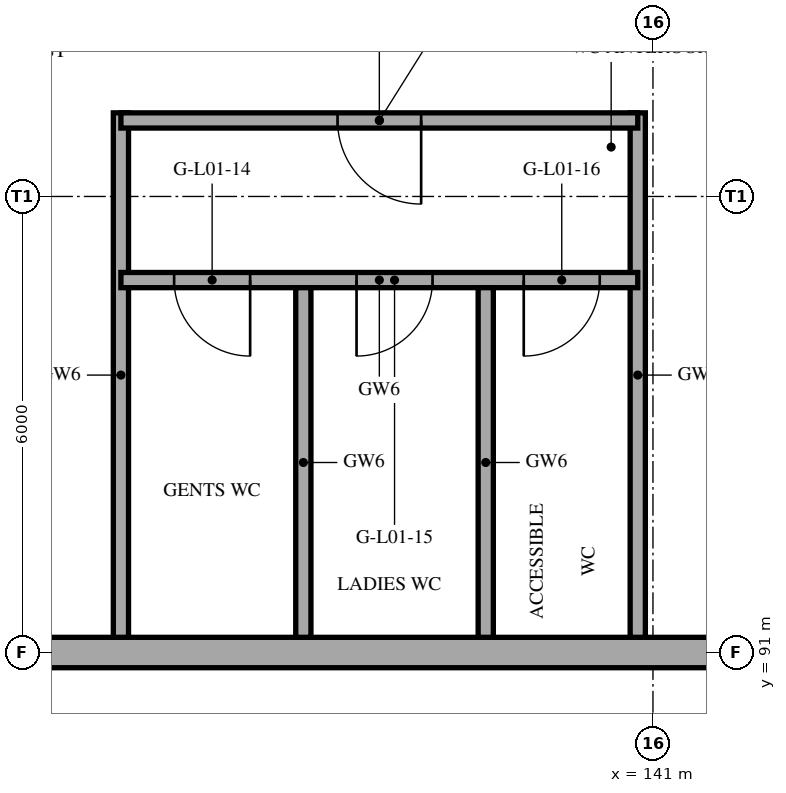
"""IFC4 building model, lengths in metres.
Left out: names, types, materials, properties, quantities, classifications, styles, units other than length and angle.
Written with IfcOpenShell. Run it as: python <this file> out.ifc"""

import sys

from ifc_helpers import new_model, si_unit, direction, frame, frame_2d, origin, place, context, subcontext, project, spatial, rectangle, extrude, element, fill, save


model = new_model("IFC4")
c1 = context("Model", 3, precision=1e-05, world=origin(), true_north=direction((0.0, 1.0)))
c2 = subcontext(c1, "Body", "Model", "MODEL_VIEW")
j1 = project(units=[si_unit("LENGTHUNIT", "METRE"), si_unit("PLANEANGLEUNIT", "RADIAN")], contexts=[c1])
p1 = place(None, origin())
s1 = spatial("IfcSite", under=j1, at=p1, CompositionType="ELEMENT")
p2 = place(p1, origin())
s2 = spatial("IfcBuilding", under=s1, at=p2, CompositionType="ELEMENT")
p3 = place(p2, frame((0.0, 0.0, 5.0)))
s3 = spatial("IfcBuildingStorey", under=s2, at=p3, CompositionType="ELEMENT", Elevation=5.0)
p4 = place(p3, frame((107.6, 91.0, 0.0), z_axis=(0.0, 0.0, 1.0), x_axis=(1.0, 0.0, 0.0)))
e1 = element("IfcWall", 1, at=p4, inside=s3, PredefinedType="SHEAR", context=c2, shape_type="SweptSolid", body=[
    extrude(rectangle(XDim=41.6, YDim=0.4, at=frame_2d((20.8, 0.0))), origin(), (0.0, 0.0, 1.0), 5.0),
])
p5 = place(p4, frame((10.9, 0.0, 1.0)))
e2 = element("IfcOpeningElement", 2, at=p5, cuts=e1, PredefinedType="OPENING", context=c2, shape_type="SweptSolid", body=[
    extrude(rectangle(XDim=3.0, YDim=1.2, at=frame_2d((1.5, 0.6))), frame((0.0, 0.21, 0.0), z_axis=(0.0, -1.0, 0.0), x_axis=(1.0, 0.0, 0.0)), (0.0, 0.0, 1.0), 0.42),
])
p6 = place(p4, frame((2.5, 0.0, 0.0)))
e3 = element("IfcOpeningElement", 3, at=p6, cuts=e1, PredefinedType="OPENING", context=c2, shape_type="SweptSolid", body=[
    extrude(rectangle(XDim=1.8, YDim=2.1, at=frame_2d((0.9, 1.05))), frame((0.0, 0.21, 0.0), z_axis=(0.0, -1.0, 0.0), x_axis=(1.0, 0.0, 0.0)), (0.0, 0.0, 1.0), 0.42),
])
p7 = place(p4, frame((37.5, 0.0, 0.0)))
e4 = element("IfcOpeningElement", 4, at=p7, cuts=e1, PredefinedType="OPENING", context=c2, shape_type="SweptSolid", body=[
    extrude(rectangle(XDim=1.8, YDim=2.1, at=frame_2d((0.9, 1.05))), frame((0.0, 0.21, 0.0), z_axis=(0.0, -1.0, 0.0), x_axis=(1.0, 0.0, 0.0)), (0.0, 0.0, 1.0), 0.42),
])
for number, where, z_axis, x_axis in (
    (5, (134.0, 91.2, 0.0), (0.0, 0.0, 1.0), (0.0, 1.0, 0.0)),
    (6, (140.8, 91.2, 0.0), (0.0, 0.0, 1.0), (0.0, 1.0, 0.0)),
):
    element("IfcWall", number, at=place(p3, frame(where, z_axis=z_axis, x_axis=x_axis)), inside=s3, PredefinedType="PARTITIONING", context=c2, shape_type="SweptSolid", body=[
        extrude(rectangle(XDim=6.9, YDim=0.2, at=frame_2d((3.45, 0.0))), origin(), (0.0, 0.0, 1.0), 4.7),
    ])
p8 = place(p3, frame((134.0, 98.0, 0.0), z_axis=(0.0, 0.0, 1.0), x_axis=(1.0, 0.0, 0.0)))
e7 = element("IfcWall", 7, at=p8, inside=s3, PredefinedType="PARTITIONING", context=c2, shape_type="SweptSolid", body=[
    extrude(rectangle(XDim=6.8, YDim=0.2, at=frame_2d((3.4, 0.0))), origin(), (0.0, 0.0, 1.0), 4.7),
])
p9 = place(p8, frame((2.85, 0.0, 0.0)))
e8 = element("IfcOpeningElement", 8, at=p9, cuts=e7, PredefinedType="OPENING", context=c2, shape_type="SweptSolid", body=[
    extrude(rectangle(XDim=1.1, YDim=2.1, at=frame_2d((0.55, 1.05))), frame((0.0, 0.11, 0.0), z_axis=(0.0, -1.0, 0.0), x_axis=(1.0, 0.0, 0.0)), (0.0, 0.0, 1.0), 0.22),
])
p10 = place(p3, frame((134.0, 95.9, 0.0), z_axis=(0.0, 0.0, 1.0), x_axis=(1.0, 0.0, 0.0)))
e9 = element("IfcWall", 9, at=p10, inside=s3, PredefinedType="PARTITIONING", context=c2, shape_type="SweptSolid", body=[
    extrude(rectangle(XDim=6.8, YDim=0.2, at=frame_2d((3.4, 0.0))), origin(), (0.0, 0.0, 1.0), 4.7),
])
p11 = place(p10, frame((0.7, 0.0, 0.0)))
e10 = element("IfcOpeningElement", 10, at=p11, cuts=e9, PredefinedType="OPENING", context=c2, shape_type="SweptSolid", body=[
    extrude(rectangle(XDim=1.0, YDim=2.1, at=frame_2d((0.5, 1.05))), frame((0.0, 0.11, 0.0), z_axis=(0.0, -1.0, 0.0), x_axis=(1.0, 0.0, 0.0)), (0.0, 0.0, 1.0), 0.22),
])
p12 = place(p10, frame((3.1, 0.0, 0.0)))
e11 = element("IfcOpeningElement", 11, at=p12, cuts=e9, PredefinedType="OPENING", context=c2, shape_type="SweptSolid", body=[
    extrude(rectangle(XDim=1.0, YDim=2.1, at=frame_2d((0.5, 1.05))), frame((0.0, 0.11, 0.0), z_axis=(0.0, -1.0, 0.0), x_axis=(1.0, 0.0, 0.0)), (0.0, 0.0, 1.0), 0.22),
])
p13 = place(p10, frame((5.3, 0.0, 0.0)))
e12 = element("IfcOpeningElement", 12, at=p13, cuts=e9, PredefinedType="OPENING", context=c2, shape_type="SweptSolid", body=[
    extrude(rectangle(XDim=1.0, YDim=2.1, at=frame_2d((0.5, 1.05))), frame((0.0, 0.11, 0.0), z_axis=(0.0, -1.0, 0.0), x_axis=(1.0, 0.0, 0.0)), (0.0, 0.0, 1.0), 0.22),
])
for number, where, z_axis, x_axis in (
    (13, (136.4, 91.2, 0.0), (0.0, 0.0, 1.0), (0.0, 1.0, 0.0)),
    (14, (138.8, 91.2, 0.0), (0.0, 0.0, 1.0), (0.0, 1.0, 0.0)),
):
    element("IfcWall", number, at=place(p3, frame(where, z_axis=z_axis, x_axis=x_axis)), inside=s3, PredefinedType="PARTITIONING", context=c2, shape_type="SweptSolid", body=[
        extrude(rectangle(XDim=4.6, YDim=0.2, at=frame_2d((2.3, 0.0))), origin(), (0.0, 0.0, 1.0), 4.7),
    ])
p14 = place(p9, frame((1.1, 0.0, 0.0), z_axis=(0.0, 0.0, 1.0), x_axis=(-1.0, 0.0, 0.0)))
e15 = element("IfcDoor", 15, at=p14, inside=s3, OperationType="SINGLE_SWING_LEFT", PredefinedType="DOOR", context=c2, shape_type="SweptSolid", body=[
    extrude(rectangle(XDim=1.1, YDim=2.1, at=frame_2d((0.55, 1.05))), frame((0.0, 0.025, 0.0), z_axis=(0.0, -1.0, 0.0), x_axis=(1.0, 0.0, 0.0)), (0.0, 0.0, 1.0), 0.05),
])
fill(e8, e15)
p15 = place(p11, frame((1.0, 0.0, 0.0), z_axis=(0.0, 0.0, 1.0), x_axis=(-1.0, 0.0, 0.0)))
e16 = element("IfcDoor", 16, at=p15, inside=s3, OperationType="SINGLE_SWING_LEFT", PredefinedType="DOOR", context=c2, shape_type="SweptSolid", body=[
    extrude(rectangle(XDim=1.0, YDim=2.1, at=frame_2d((0.5, 1.05))), frame((0.0, 0.025, 0.0), z_axis=(0.0, -1.0, 0.0), x_axis=(1.0, 0.0, 0.0)), (0.0, 0.0, 1.0), 0.05),
])
fill(e10, e16)
p16 = place(p12, frame((1.0, 0.0, 0.0), z_axis=(0.0, 0.0, 1.0), x_axis=(-1.0, 0.0, 0.0)))
e17 = element("IfcDoor", 17, at=p16, inside=s3, OperationType="SINGLE_SWING_RIGHT", PredefinedType="DOOR", context=c2, shape_type="SweptSolid", body=[
    extrude(rectangle(XDim=1.0, YDim=2.1, at=frame_2d((0.5, 1.05))), frame((0.0, 0.025, 0.0), z_axis=(0.0, -1.0, 0.0), x_axis=(1.0, 0.0, 0.0)), (0.0, 0.0, 1.0), 0.05),
])
fill(e11, e17)
p17 = place(p13, frame((1.0, 0.0, 0.0), z_axis=(0.0, 0.0, 1.0), x_axis=(-1.0, 0.0, 0.0)))
e18 = element("IfcDoor", 18, at=p17, inside=s3, OperationType="SINGLE_SWING_RIGHT", PredefinedType="DOOR", context=c2, shape_type="SweptSolid", body=[
    extrude(rectangle(XDim=1.0, YDim=2.1, at=frame_2d((0.5, 1.05))), frame((0.0, 0.025, 0.0), z_axis=(0.0, -1.0, 0.0), x_axis=(1.0, 0.0, 0.0)), (0.0, 0.0, 1.0), 0.05),
])
fill(e12, e18)
save(model, sys.argv[1])
